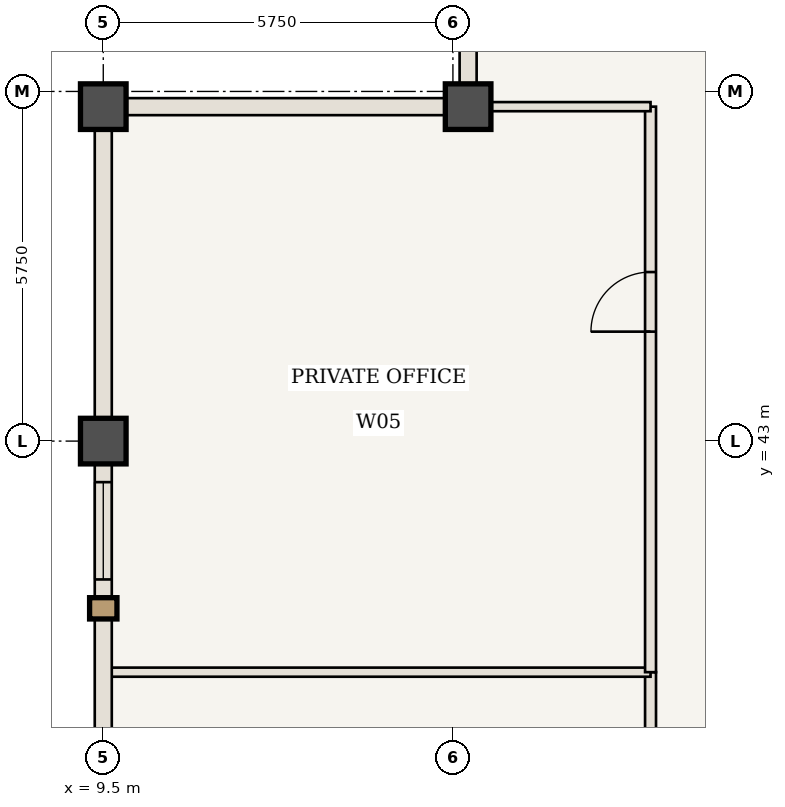
"""IFC4 building model, lengths in metres.
Left out: names, types, materials, properties, quantities, classifications, styles, units other than length and angle.
Written with IfcOpenShell. Run it as: python <this file> out.ifc"""

import sys

from ifc_helpers import new_model, si_unit, direction, frame, frame_2d, origin, origin_2d, place, context, subcontext, project, spatial, rectangle, extrude, element, fill, save


model = new_model("IFC4")
c1 = context("Model", 3, precision=1e-05, world=origin(), true_north=direction((0.0, 1.0)))
c2 = subcontext(c1, "Body", "Model", "MODEL_VIEW")
j1 = project(units=[si_unit("LENGTHUNIT", "METRE"), si_unit("PLANEANGLEUNIT", "RADIAN")], contexts=[c1])
p1 = place(None, origin())
s1 = spatial("IfcSite", under=j1, at=p1, CompositionType="ELEMENT")
p2 = place(p1, origin())
s2 = spatial("IfcBuilding", under=s1, at=p2, CompositionType="ELEMENT")
p3 = place(p2, frame((0.0, 0.0, 285.25)))
s3 = spatial("IfcBuildingStorey", under=s2, at=p3, CompositionType="ELEMENT", Elevation=285.25)
for number, where, z_axis, x_axis in (
    (1, (15.5, 48.5, 0.0), (0.0, 0.0, 1.0), (1.0, 0.0, 0.0)),
    (2, (9.5, 48.5, 0.0), (0.0, 0.0, 1.0), (1.0, 0.0, 0.0)),
    (3, (9.5, 43.0, 0.0), (0.0, 0.0, 1.0), (1.0, 0.0, 0.0)),
):
    element("IfcColumn", number, at=place(p3, frame(where, z_axis=z_axis, x_axis=x_axis)), inside=s3, PredefinedType="COLUMN", context=c2, shape_type="SweptSolid", body=[
        extrude(rectangle(XDim=0.75, YDim=0.75, at=origin_2d()), origin(), (0.0, 0.0, 1.0), 3.85),
    ])
p4 = place(p3, frame((18.5, 32.8, 0.0), z_axis=(0.0, 0.0, 1.0), x_axis=(0.0, 1.0, 0.0)))
e4 = element("IfcWall", 4, at=p4, inside=s3, PredefinedType="STANDARD", context=c2, shape_type="SweptSolid", body=[
    extrude(rectangle(XDim=6.4, YDim=0.18, at=frame_2d((3.2, 0.0))), origin(), (0.0, 0.0, 1.0), 3.685),
])
p5 = place(p4, frame((2.7, 0.0, 0.0)))
e5 = element("IfcOpeningElement", 5, at=p5, cuts=e4, PredefinedType="OPENING", context=c2, shape_type="SweptSolid", body=[
    extrude(rectangle(XDim=0.98, YDim=2.2, at=frame_2d((0.49, 1.1))), frame((0.0, 0.1, 0.0), z_axis=(0.0, -1.0, 0.0), x_axis=(1.0, 0.0, 0.0)), (0.0, 0.0, 1.0), 0.2),
])
p6 = place(p3, frame((9.56, 39.2, 0.0), z_axis=(0.0, 0.0, 1.0), x_axis=(1.0, 0.0, 0.0)))
e6 = element("IfcWall", 6, at=p6, inside=s3, PredefinedType="STANDARD", context=c2, shape_type="SweptSolid", body=[
    extrude(rectangle(XDim=8.94, YDim=0.15, at=frame_2d((4.47, 0.0))), origin(), (0.0, 0.0, 1.0), 3.685),
])
p7 = place(p3, frame((18.5, 39.2, 0.0), z_axis=(0.0, 0.0, 1.0), x_axis=(0.0, 1.0, 0.0)))
e7 = element("IfcWall", 7, at=p7, inside=s3, PredefinedType="STANDARD", context=c2, shape_type="SweptSolid", body=[
    extrude(rectangle(XDim=9.3, YDim=0.18, at=frame_2d((4.65, 0.0))), origin(), (0.0, 0.0, 1.0), 3.685),
])
p8 = place(p7, frame((5.6, 0.0, 0.0)))
e8 = element("IfcOpeningElement", 8, at=p8, cuts=e7, PredefinedType="OPENING", context=c2, shape_type="SweptSolid", body=[
    extrude(rectangle(XDim=0.98, YDim=2.2, at=frame_2d((0.49, 1.1))), frame((0.0, 0.1, 0.0), z_axis=(0.0, -1.0, 0.0), x_axis=(1.0, 0.0, 0.0)), (0.0, 0.0, 1.0), 0.2),
])
p9 = place(p3, frame((15.5, 48.5, 0.0), z_axis=(0.0, 0.0, 1.0), x_axis=(1.0, 0.0, 0.0)))
e9 = element("IfcWall", 9, at=p9, inside=s3, PredefinedType="STANDARD", context=c2, shape_type="SweptSolid", body=[
    extrude(rectangle(XDim=3.0, YDim=0.15, at=frame_2d((1.5, 0.0))), origin(), (0.0, 0.0, 1.0), 3.685),
])
p10 = place(p3, frame((9.5, 37.5, 0.0), z_axis=(0.0, 0.0, 1.0), x_axis=(0.0, 1.0, 0.0)))
e10 = element("IfcWall", 10, at=p10, inside=s3, PredefinedType="USERDEFINED", context=c2, shape_type="SweptSolid", body=[
    extrude(rectangle(XDim=5.5, YDim=0.28, at=frame_2d((2.75, 0.0))), origin(), (0.0, 0.0, 1.0), 2.985),
])
p11 = place(p10, frame((3.225, 0.0, 0.85)))
e11 = element("IfcOpeningElement", 11, at=p11, cuts=e10, PredefinedType="OPENING", context=c2, shape_type="SweptSolid", body=[
    extrude(rectangle(XDim=1.6, YDim=1.935, at=frame_2d((0.8, 0.968))), frame((0.0, 0.15, 0.0), z_axis=(0.0, -1.0, 0.0), x_axis=(1.0, 0.0, 0.0)), (0.0, 0.0, 1.0), 0.3),
])
p12 = place(p3, frame((9.5, 43.0, 0.0), z_axis=(0.0, 0.0, 1.0), x_axis=(0.0, 1.0, 0.0)))
e12 = element("IfcWall", 12, at=p12, inside=s3, PredefinedType="USERDEFINED", context=c2, shape_type="SweptSolid", body=[
    extrude(rectangle(XDim=5.5, YDim=0.28, at=frame_2d((2.75, 0.0))), origin(), (0.0, 0.0, 1.0), 2.985),
])
for number, where, z_axis, x_axis in (
    (13, (15.5, 48.5, 0.0), (0.0, 0.0, 1.0), (0.0, 1.0, 0.0)),
    (14, (9.5, 48.5, 0.0), (0.0, 0.0, 1.0), (1.0, 0.0, 0.0)),
):
    element("IfcWall", number, at=place(p3, frame(where, z_axis=z_axis, x_axis=x_axis)), inside=s3, PredefinedType="USERDEFINED", context=c2, shape_type="SweptSolid", body=[
        extrude(rectangle(XDim=6.0, YDim=0.28, at=frame_2d((3.0, 0.0))), origin(), (0.0, 0.0, 1.0), 2.985),
    ])
p13 = place(p8, origin())
e15 = element("IfcDoor", 15, at=p13, inside=s3, OperationType="SINGLE_SWING_LEFT", PredefinedType="DOOR", context=c2, shape_type="SweptSolid", body=[
    extrude(rectangle(XDim=0.98, YDim=2.2, at=frame_2d((0.49, 1.1))), frame((0.0, 0.025, 0.0), z_axis=(0.0, -1.0, 0.0), x_axis=(1.0, 0.0, 0.0)), (0.0, 0.0, 1.0), 0.05),
])
fill(e8, e15)
p14 = place(p11, origin())
e16 = element("IfcWindow", 16, at=p14, inside=s3, PartitioningType="SINGLE_PANEL", PredefinedType="WINDOW", context=c2, shape_type="SweptSolid", body=[
    extrude(rectangle(XDim=1.6, YDim=1.935, at=frame_2d((0.8, 0.968))), frame((0.0, 0.03, 0.0), z_axis=(0.0, -1.0, 0.0), x_axis=(1.0, 0.0, 0.0)), (0.0, 0.0, 1.0), 0.06),
])
fill(e11, e16)
save(model, sys.argv[1])
